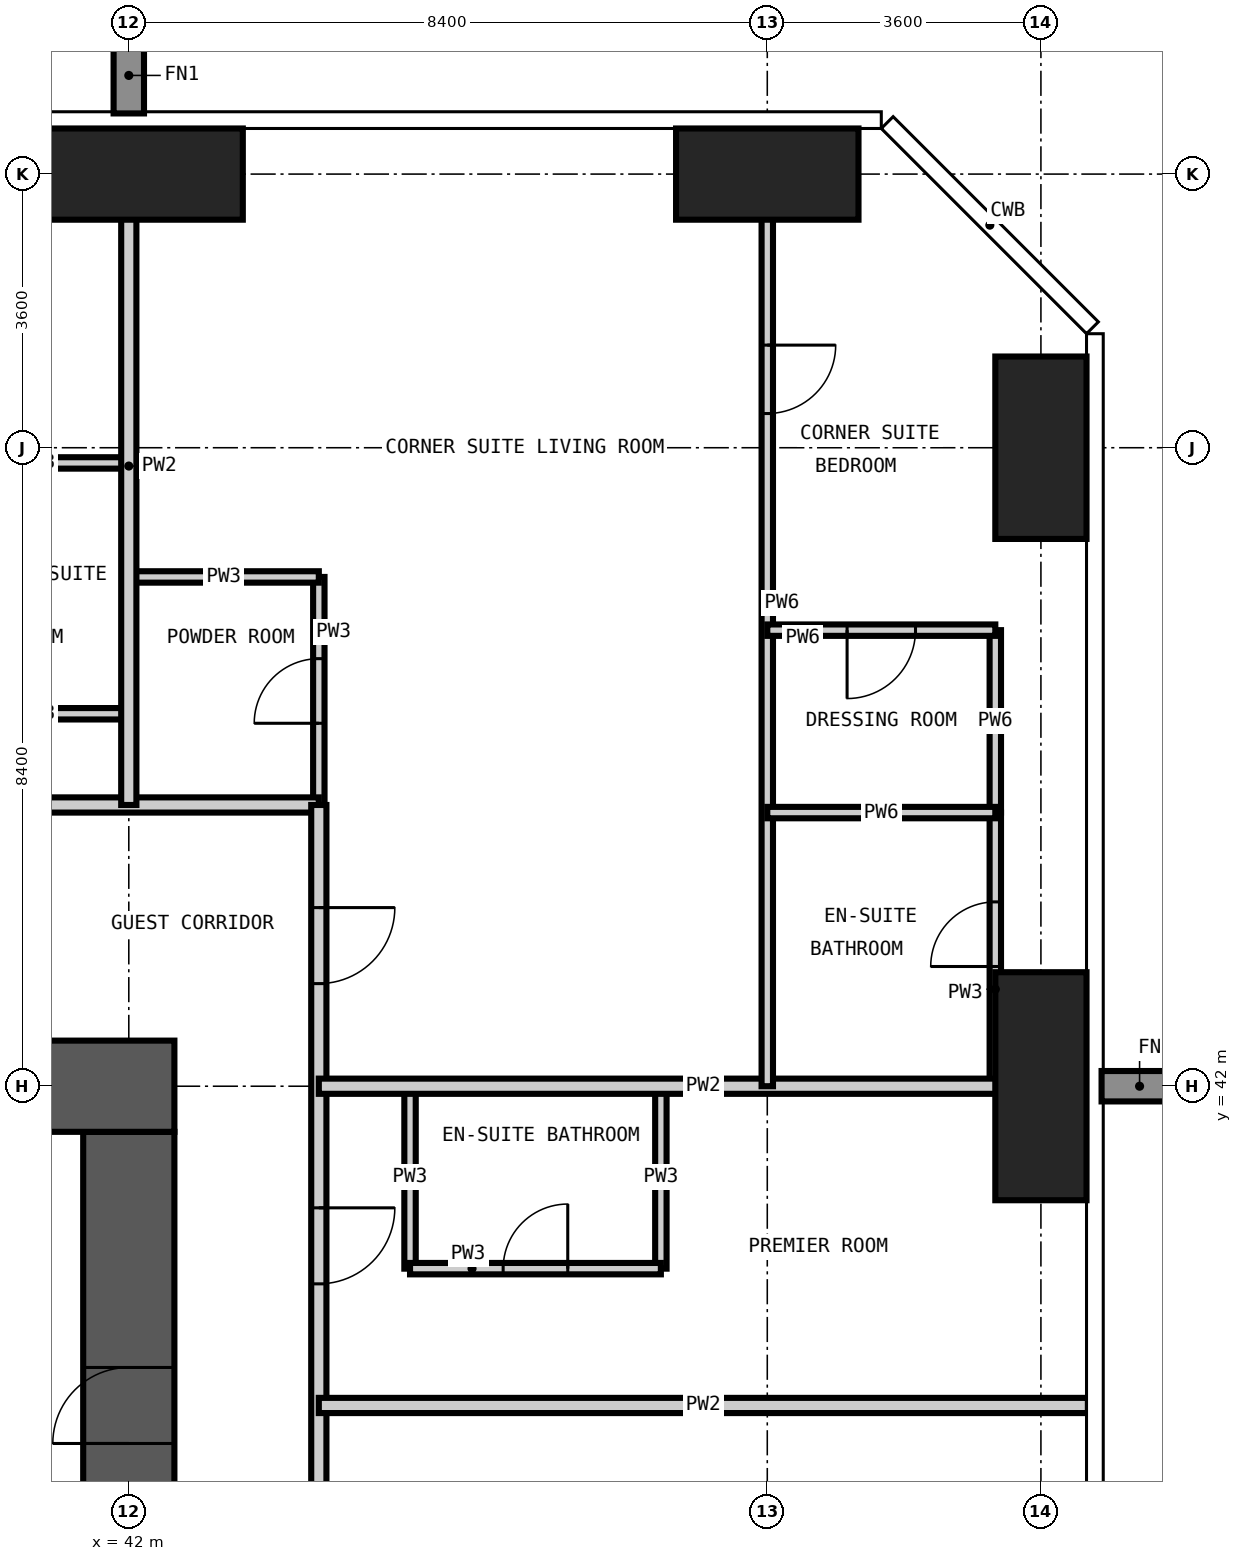
"""IFC4 building model, lengths in metres.
Left out: names, types, materials, properties, quantities, classifications, styles, units other than length and angle.
Written with IfcOpenShell. Run it as: python <this file> out.ifc"""

import sys

from ifc_helpers import new_model, si_unit, direction, frame, frame_2d, origin, origin_2d, place, context, subcontext, project, spatial, rectangle, extrude, element, fill, save


model = new_model("IFC4")
c1 = context("Model", 3, precision=1e-05, world=origin(), true_north=direction((0.0, 1.0)))
c2 = subcontext(c1, "Body", "Model", "MODEL_VIEW")
j1 = project(units=[si_unit("LENGTHUNIT", "METRE"), si_unit("PLANEANGLEUNIT", "RADIAN")], contexts=[c1])
p1 = place(None, origin())
s1 = spatial("IfcSite", under=j1, at=p1, CompositionType="ELEMENT")
p2 = place(p1, origin())
s2 = spatial("IfcBuilding", under=s1, at=p2, CompositionType="ELEMENT")
p3 = place(p2, frame((0.0, 0.0, 97.2)))
s3 = spatial("IfcBuildingStorey", under=s2, at=p3, CompositionType="ELEMENT", Elevation=97.2)
p4 = place(p3, frame((42.0, 54.0, -0.35), z_axis=(0.0, 0.0, 1.0), x_axis=(1.0, 0.0, 0.0)))
e1 = element("IfcColumn", 1, at=p4, inside=s3, PredefinedType="COLUMN", context=c2, shape_type="SweptSolid", body=[
    extrude(rectangle(XDim=3.0, YDim=1.2, at=origin_2d()), origin(), (0.0, 0.0, 1.0), 3.6),
])
p5 = place(p3, frame((50.4, 54.0, -0.35), z_axis=(0.0, 0.0, 1.0), x_axis=(1.0, 0.0, 0.0)))
e2 = element("IfcColumn", 2, at=p5, inside=s3, PredefinedType="COLUMN", context=c2, shape_type="SweptSolid", body=[
    extrude(rectangle(XDim=2.4, YDim=1.2, at=origin_2d()), origin(), (0.0, 0.0, 1.0), 3.6),
])
p6 = place(p3, frame((54.0, 42.0, -0.35), z_axis=(0.0, 0.0, 1.0), x_axis=(1.0, 0.0, 0.0)))
e3 = element("IfcColumn", 3, at=p6, inside=s3, PredefinedType="COLUMN", context=c2, shape_type="SweptSolid", body=[
    extrude(rectangle(XDim=1.2, YDim=3.0, at=origin_2d()), origin(), (0.0, 0.0, 1.0), 3.6),
])
p7 = place(p3, frame((54.0, 50.4, -0.35), z_axis=(0.0, 0.0, 1.0), x_axis=(1.0, 0.0, 0.0)))
e4 = element("IfcColumn", 4, at=p7, inside=s3, PredefinedType="COLUMN", context=c2, shape_type="SweptSolid", body=[
    extrude(rectangle(XDim=1.2, YDim=2.4, at=origin_2d()), origin(), (0.0, 0.0, 1.0), 3.6),
])
p8 = place(p3, frame((42.0, 17.4, -0.35), z_axis=(0.0, 0.0, 1.0), x_axis=(0.0, 1.0, 0.0)))
e5 = element("IfcWall", 5, at=p8, inside=s3, PredefinedType="SHEAR", context=c2, shape_type="SweptSolid", body=[
    extrude(rectangle(XDim=24.0, YDim=1.2, at=frame_2d((12.0, 0.0))), origin(), (0.0, 0.0, 1.0), 3.6),
])
p9 = place(p8, frame((0.2, 0.0, 0.35)))
e6 = element("IfcOpeningElement", 6, at=p9, cuts=e5, PredefinedType="OPENING", context=c2, shape_type="SweptSolid", body=[
    extrude(rectangle(XDim=1.2, YDim=2.2, at=frame_2d((0.6, 1.1))), frame((0.0, 0.61, 0.0), z_axis=(0.0, -1.0, 0.0), x_axis=(1.0, 0.0, 0.0)), (0.0, 0.0, 1.0), 1.22),
])
p10 = place(p8, frame((11.1, 0.0, 0.35)))
e7 = element("IfcOpeningElement", 7, at=p10, cuts=e5, PredefinedType="OPENING", context=c2, shape_type="SweptSolid", body=[
    extrude(rectangle(XDim=1.8, YDim=2.2, at=frame_2d((0.9, 1.1))), frame((0.0, 0.61, 0.0), z_axis=(0.0, -1.0, 0.0), x_axis=(1.0, 0.0, 0.0)), (0.0, 0.0, 1.0), 1.22),
])
p11 = place(p8, frame((19.9, 0.0, 0.35)))
e8 = element("IfcOpeningElement", 8, at=p11, cuts=e5, PredefinedType="OPENING", context=c2, shape_type="SweptSolid", body=[
    extrude(rectangle(XDim=1.0, YDim=2.1, at=frame_2d((0.5, 1.05))), frame((0.0, 0.61, 0.0), z_axis=(0.0, -1.0, 0.0), x_axis=(1.0, 0.0, 0.0)), (0.0, 0.0, 1.0), 1.22),
])
p12 = place(p3, frame((42.6, 42.0, -0.35), z_axis=(0.0, 0.0, 1.0), x_axis=(-1.0, 0.0, 0.0)))
e9 = element("IfcWall", 9, at=p12, inside=s3, PredefinedType="SHEAR", context=c2, shape_type="SweptSolid", body=[
    extrude(rectangle(XDim=26.4, YDim=1.2, at=frame_2d((13.2, 0.0))), origin(), (0.0, 0.0, 1.0), 3.6),
])
p13 = place(p12, frame((21.1, 0.0, 0.35)))
e10 = element("IfcOpeningElement", 10, at=p13, cuts=e9, PredefinedType="OPENING", context=c2, shape_type="SweptSolid", body=[
    extrude(rectangle(XDim=1.0, YDim=2.1, at=frame_2d((0.5, 1.05))), frame((0.0, 0.61, 0.0), z_axis=(0.0, -1.0, 0.0), x_axis=(1.0, 0.0, 0.0)), (0.0, 0.0, 1.0), 1.22),
])
p14 = place(p12, frame((10.5, 0.0, 0.35)))
e11 = element("IfcOpeningElement", 11, at=p14, cuts=e9, PredefinedType="OPENING", context=c2, shape_type="SweptSolid", body=[
    extrude(rectangle(XDim=1.2, YDim=2.2, at=frame_2d((0.6, 1.1))), frame((0.0, 0.61, 0.0), z_axis=(0.0, -1.0, 0.0), x_axis=(1.0, 0.0, 0.0)), (0.0, 0.0, 1.0), 1.22),
])
p15 = place(p3, frame((44.5, 45.7, 0.0), z_axis=(0.0, 0.0, 1.0), x_axis=(0.0, 1.0, 0.0)))
e12 = element("IfcWall", 12, at=p15, inside=s3, PredefinedType="PARTITIONING", context=c2, shape_type="SweptSolid", body=[
    extrude(rectangle(XDim=3.0, YDim=0.15, at=frame_2d((1.5, 0.0))), origin(), (0.0, 0.0, 1.0), 3.25),
])
p16 = place(p15, frame((1.075, 0.0, 0.0)))
e13 = element("IfcOpeningElement", 13, at=p16, cuts=e12, PredefinedType="OPENING", context=c2, shape_type="SweptSolid", body=[
    extrude(rectangle(XDim=0.85, YDim=2.1, at=frame_2d((0.425, 1.05))), frame((0.0, 0.085, 0.0), z_axis=(0.0, -1.0, 0.0), x_axis=(1.0, 0.0, 0.0)), (0.0, 0.0, 1.0), 0.17),
])
for number, where, z_axis, x_axis in (
    (14, (45.7, 39.6, 0.0), (0.0, 0.0, 1.0), (0.0, 1.0, 0.0)),
    (15, (49.0, 39.6, 0.0), (0.0, 0.0, 1.0), (0.0, 1.0, 0.0)),
):
    element("IfcWall", number, at=place(p3, frame(where, z_axis=z_axis, x_axis=x_axis)), inside=s3, PredefinedType="PARTITIONING", context=c2, shape_type="SweptSolid", body=[
        extrude(rectangle(XDim=2.4, YDim=0.15, at=frame_2d((1.2, 0.0))), origin(), (0.0, 0.0, 1.0), 3.25),
    ])
p17 = place(p3, frame((53.4, 42.0, 0.0), z_axis=(0.0, 0.0, 1.0), x_axis=(0.0, 1.0, 0.0)))
e16 = element("IfcWall", 16, at=p17, inside=s3, PredefinedType="PARTITIONING", context=c2, shape_type="SweptSolid", body=[
    extrude(rectangle(XDim=3.6, YDim=0.15, at=frame_2d((1.8, 0.0))), origin(), (0.0, 0.0, 1.0), 3.25),
])
p18 = place(p17, frame((1.575, 0.0, 0.0)))
e17 = element("IfcOpeningElement", 17, at=p18, cuts=e16, PredefinedType="OPENING", context=c2, shape_type="SweptSolid", body=[
    extrude(rectangle(XDim=0.85, YDim=2.1, at=frame_2d((0.425, 1.05))), frame((0.0, 0.085, 0.0), z_axis=(0.0, -1.0, 0.0), x_axis=(1.0, 0.0, 0.0)), (0.0, 0.0, 1.0), 0.17),
])
p19 = place(p3, frame((45.7, 39.6, 0.0), z_axis=(0.0, 0.0, 1.0), x_axis=(1.0, 0.0, 0.0)))
e18 = element("IfcWall", 18, at=p19, inside=s3, PredefinedType="PARTITIONING", context=c2, shape_type="SweptSolid", body=[
    extrude(rectangle(XDim=3.3, YDim=0.15, at=frame_2d((1.65, 0.0))), origin(), (0.0, 0.0, 1.0), 3.25),
])
p20 = place(p19, frame((1.225, 0.0, 0.0)))
e19 = element("IfcOpeningElement", 19, at=p20, cuts=e18, PredefinedType="OPENING", context=c2, shape_type="SweptSolid", body=[
    extrude(rectangle(XDim=0.85, YDim=2.1, at=frame_2d((0.425, 1.05))), frame((0.0, 0.085, 0.0), z_axis=(0.0, -1.0, 0.0), x_axis=(1.0, 0.0, 0.0)), (0.0, 0.0, 1.0), 0.17),
])
p21 = place(p3, frame((39.6, 46.9, 0.0), z_axis=(0.0, 0.0, 1.0), x_axis=(1.0, 0.0, 0.0)))
e20 = element("IfcWall", 20, at=p21, inside=s3, PredefinedType="PARTITIONING", context=c2, shape_type="SweptSolid", body=[
    extrude(rectangle(XDim=2.4, YDim=0.15, at=frame_2d((1.2, 0.0))), origin(), (0.0, 0.0, 1.0), 3.25),
])
p22 = place(p3, frame((42.0, 48.7, 0.0), z_axis=(0.0, 0.0, 1.0), x_axis=(1.0, 0.0, 0.0)))
e21 = element("IfcWall", 21, at=p22, inside=s3, PredefinedType="PARTITIONING", context=c2, shape_type="SweptSolid", body=[
    extrude(rectangle(XDim=2.5, YDim=0.15, at=frame_2d((1.25, 0.0))), origin(), (0.0, 0.0, 1.0), 3.25),
])
p23 = place(p3, frame((39.6, 50.2, 0.0), z_axis=(0.0, 0.0, 1.0), x_axis=(1.0, 0.0, 0.0)))
e22 = element("IfcWall", 22, at=p23, inside=s3, PredefinedType="PARTITIONING", context=c2, shape_type="SweptSolid", body=[
    extrude(rectangle(XDim=2.4, YDim=0.15, at=frame_2d((1.2, 0.0))), origin(), (0.0, 0.0, 1.0), 3.25),
])
p24 = place(p3, frame((12.6, 45.7, 0.0), z_axis=(0.0, 0.0, 1.0), x_axis=(1.0, 0.0, 0.0)))
e23 = element("IfcWall", 23, at=p24, inside=s3, PredefinedType="PARTITIONING", context=c2, shape_type="SweptSolid", body=[
    extrude(rectangle(XDim=31.9, YDim=0.2, at=frame_2d((15.95, 0.0))), origin(), (0.0, 0.0, 1.0), 3.25),
])
p25 = place(p24, frame((5.8, 0.0, 0.0)))
e24 = element("IfcOpeningElement", 24, at=p25, cuts=e23, PredefinedType="OPENING", context=c2, shape_type="SweptSolid", body=[
    extrude(rectangle(XDim=1.0, YDim=2.2, at=frame_2d((0.5, 1.1))), frame((0.0, 0.11, 0.0), z_axis=(0.0, -1.0, 0.0), x_axis=(1.0, 0.0, 0.0)), (0.0, 0.0, 1.0), 0.22),
])
p26 = place(p24, frame((12.1, 0.0, 0.0)))
e25 = element("IfcOpeningElement", 25, at=p26, cuts=e23, PredefinedType="OPENING", context=c2, shape_type="SweptSolid", body=[
    extrude(rectangle(XDim=1.0, YDim=2.2, at=frame_2d((0.5, 1.1))), frame((0.0, 0.11, 0.0), z_axis=(0.0, -1.0, 0.0), x_axis=(1.0, 0.0, 0.0)), (0.0, 0.0, 1.0), 0.22),
])
p27 = place(p24, frame((20.5, 0.0, 0.0)))
e26 = element("IfcOpeningElement", 26, at=p27, cuts=e23, PredefinedType="OPENING", context=c2, shape_type="SweptSolid", body=[
    extrude(rectangle(XDim=1.0, YDim=2.2, at=frame_2d((0.5, 1.1))), frame((0.0, 0.11, 0.0), z_axis=(0.0, -1.0, 0.0), x_axis=(1.0, 0.0, 0.0)), (0.0, 0.0, 1.0), 0.22),
])
p28 = place(p24, frame((26.8, 0.0, 0.0)))
e27 = element("IfcOpeningElement", 27, at=p28, cuts=e23, PredefinedType="OPENING", context=c2, shape_type="SweptSolid", body=[
    extrude(rectangle(XDim=1.0, YDim=2.2, at=frame_2d((0.5, 1.1))), frame((0.0, 0.11, 0.0), z_axis=(0.0, -1.0, 0.0), x_axis=(1.0, 0.0, 0.0)), (0.0, 0.0, 1.0), 0.22),
])
p29 = place(p3, frame((44.5, 45.7, 0.0), z_axis=(0.0, 0.0, 1.0), x_axis=(0.0, -1.0, 0.0)))
e28 = element("IfcWall", 28, at=p29, inside=s3, PredefinedType="PARTITIONING", context=c2, shape_type="SweptSolid", body=[
    extrude(rectangle(XDim=32.0, YDim=0.2, at=frame_2d((16.0, 0.0))), origin(), (0.0, 0.0, 1.0), 3.25),
])
p30 = place(p29, frame((26.3, 0.0, 0.0)))
e29 = element("IfcOpeningElement", 29, at=p30, cuts=e28, PredefinedType="OPENING", context=c2, shape_type="SweptSolid", body=[
    extrude(rectangle(XDim=1.0, YDim=2.2, at=frame_2d((0.5, 1.1))), frame((0.0, 0.11, 0.0), z_axis=(0.0, -1.0, 0.0), x_axis=(1.0, 0.0, 0.0)), (0.0, 0.0, 1.0), 0.22),
])
p31 = place(p29, frame((20.0, 0.0, 0.0)))
e30 = element("IfcOpeningElement", 30, at=p31, cuts=e28, PredefinedType="OPENING", context=c2, shape_type="SweptSolid", body=[
    extrude(rectangle(XDim=1.0, YDim=2.2, at=frame_2d((0.5, 1.1))), frame((0.0, 0.11, 0.0), z_axis=(0.0, -1.0, 0.0), x_axis=(1.0, 0.0, 0.0)), (0.0, 0.0, 1.0), 0.22),
])
p32 = place(p29, frame((11.6, 0.0, 0.0)))
e31 = element("IfcOpeningElement", 31, at=p32, cuts=e28, PredefinedType="OPENING", context=c2, shape_type="SweptSolid", body=[
    extrude(rectangle(XDim=1.0, YDim=2.2, at=frame_2d((0.5, 1.1))), frame((0.0, 0.11, 0.0), z_axis=(0.0, -1.0, 0.0), x_axis=(1.0, 0.0, 0.0)), (0.0, 0.0, 1.0), 0.22),
])
p33 = place(p29, frame((5.3, 0.0, 0.0)))
e32 = element("IfcOpeningElement", 32, at=p33, cuts=e28, PredefinedType="OPENING", context=c2, shape_type="SweptSolid", body=[
    extrude(rectangle(XDim=1.0, YDim=2.2, at=frame_2d((0.5, 1.1))), frame((0.0, 0.11, 0.0), z_axis=(0.0, -1.0, 0.0), x_axis=(1.0, 0.0, 0.0)), (0.0, 0.0, 1.0), 0.22),
])
p34 = place(p29, frame((29.95, 0.0, 0.0)))
e33 = element("IfcOpeningElement", 33, at=p34, cuts=e28, PredefinedType="OPENING", context=c2, shape_type="SweptSolid", body=[
    extrude(rectangle(XDim=1.0, YDim=2.2, at=frame_2d((0.5, 1.1))), frame((0.0, 0.11, 0.0), z_axis=(0.0, -1.0, 0.0), x_axis=(1.0, 0.0, 0.0)), (0.0, 0.0, 1.0), 0.22),
])
p35 = place(p29, frame((1.35, 0.0, 0.0)))
e34 = element("IfcOpeningElement", 34, at=p35, cuts=e28, PredefinedType="OPENING", context=c2, shape_type="SweptSolid", body=[
    extrude(rectangle(XDim=1.0, YDim=2.2, at=frame_2d((0.5, 1.1))), frame((0.0, 0.11, 0.0), z_axis=(0.0, -1.0, 0.0), x_axis=(1.0, 0.0, 0.0)), (0.0, 0.0, 1.0), 0.22),
])
p36 = place(p3, frame((42.0, 45.7, 0.0), z_axis=(0.0, 0.0, 1.0), x_axis=(0.0, 1.0, 0.0)))
e35 = element("IfcWall", 35, at=p36, inside=s3, PredefinedType="PARTITIONING", context=c2, shape_type="SweptSolid", body=[
    extrude(rectangle(XDim=8.918, YDim=0.2, at=frame_2d((4.459, 0.0))), origin(), (0.0, 0.0, 1.0), 3.25),
])
for number, where, z_axis, x_axis in (
    (36, (44.5, 37.8, 0.0), (0.0, 0.0, 1.0), (1.0, 0.0, 0.0)),
    (37, (44.5, 42.0, 0.0), (0.0, 0.0, 1.0), (1.0, 0.0, 0.0)),
):
    element("IfcWall", number, at=place(p3, frame(where, z_axis=z_axis, x_axis=x_axis)), inside=s3, PredefinedType="PARTITIONING", context=c2, shape_type="SweptSolid", body=[
        extrude(rectangle(XDim=10.118, YDim=0.2, at=frame_2d((5.059, 0.0))), origin(), (0.0, 0.0, 1.0), 3.25),
    ])
p37 = place(p3, frame((50.4, 42.0, 0.0), z_axis=(0.0, 0.0, 1.0), x_axis=(0.0, 1.0, 0.0)))
e38 = element("IfcWall", 38, at=p37, inside=s3, PredefinedType="PARTITIONING", context=c2, shape_type="SweptSolid", body=[
    extrude(rectangle(XDim=12.618, YDim=0.15, at=frame_2d((6.309, 0.0))), origin(), (0.0, 0.0, 1.0), 3.25),
])
p38 = place(p37, frame((8.85, 0.0, 0.0)))
e39 = element("IfcOpeningElement", 39, at=p38, cuts=e38, PredefinedType="OPENING", context=c2, shape_type="SweptSolid", body=[
    extrude(rectangle(XDim=0.9, YDim=2.1, at=frame_2d((0.45, 1.05))), frame((0.0, 0.085, 0.0), z_axis=(0.0, -1.0, 0.0), x_axis=(1.0, 0.0, 0.0)), (0.0, 0.0, 1.0), 0.17),
])
p39 = place(p3, frame((53.4, 45.6, 0.0), z_axis=(0.0, 0.0, 1.0), x_axis=(0.0, 1.0, 0.0)))
e40 = element("IfcWall", 40, at=p39, inside=s3, PredefinedType="PARTITIONING", context=c2, shape_type="SweptSolid", body=[
    extrude(rectangle(XDim=2.4, YDim=0.15, at=frame_2d((1.2, 0.0))), origin(), (0.0, 0.0, 1.0), 3.25),
])
p40 = place(p3, frame((50.4, 45.6, 0.0), z_axis=(0.0, 0.0, 1.0), x_axis=(1.0, 0.0, 0.0)))
e41 = element("IfcWall", 41, at=p40, inside=s3, PredefinedType="PARTITIONING", context=c2, shape_type="SweptSolid", body=[
    extrude(rectangle(XDim=3.0, YDim=0.15, at=frame_2d((1.5, 0.0))), origin(), (0.0, 0.0, 1.0), 3.25),
])
p41 = place(p3, frame((50.4, 48.0, 0.0), z_axis=(0.0, 0.0, 1.0), x_axis=(1.0, 0.0, 0.0)))
e42 = element("IfcWall", 42, at=p41, inside=s3, PredefinedType="PARTITIONING", context=c2, shape_type="SweptSolid", body=[
    extrude(rectangle(XDim=3.0, YDim=0.15, at=frame_2d((1.5, 0.0))), origin(), (0.0, 0.0, 1.0), 3.25),
])
p42 = place(p41, frame((1.05, 0.0, 0.0)))
e43 = element("IfcOpeningElement", 43, at=p42, cuts=e42, PredefinedType="OPENING", context=c2, shape_type="SweptSolid", body=[
    extrude(rectangle(XDim=0.9, YDim=2.1, at=frame_2d((0.45, 1.05))), frame((0.0, 0.085, 0.0), z_axis=(0.0, -1.0, 0.0), x_axis=(1.0, 0.0, 0.0)), (0.0, 0.0, 1.0), 0.17),
])
p43 = place(p33, origin())
e44 = element("IfcDoor", 44, at=p43, inside=s3, OperationType="SINGLE_SWING_LEFT", PredefinedType="DOOR", context=c2, shape_type="SweptSolid", body=[
    extrude(rectangle(XDim=1.0, YDim=2.2, at=frame_2d((0.5, 1.1))), frame((0.0, 0.025, 0.0), z_axis=(0.0, -1.0, 0.0), x_axis=(1.0, 0.0, 0.0)), (0.0, 0.0, 1.0), 0.05),
])
fill(e32, e44)
p44 = place(p20, origin())
e45 = element("IfcDoor", 45, at=p44, inside=s3, OperationType="SINGLE_SWING_RIGHT", PredefinedType="DOOR", context=c2, shape_type="SweptSolid", body=[
    extrude(rectangle(XDim=0.85, YDim=2.1, at=frame_2d((0.425, 1.05))), frame((0.0, 0.025, 0.0), z_axis=(0.0, -1.0, 0.0), x_axis=(1.0, 0.0, 0.0)), (0.0, 0.0, 1.0), 0.05),
])
fill(e19, e45)
p45 = place(p35, origin())
e46 = element("IfcDoor", 46, at=p45, inside=s3, OperationType="SINGLE_SWING_LEFT", PredefinedType="DOOR", context=c2, shape_type="SweptSolid", body=[
    extrude(rectangle(XDim=1.0, YDim=2.2, at=frame_2d((0.5, 1.1))), frame((0.0, 0.025, 0.0), z_axis=(0.0, -1.0, 0.0), x_axis=(1.0, 0.0, 0.0)), (0.0, 0.0, 1.0), 0.05),
])
fill(e34, e46)
p46 = place(p16, origin())
e47 = element("IfcDoor", 47, at=p46, inside=s3, OperationType="SINGLE_SWING_LEFT", PredefinedType="DOOR", context=c2, shape_type="SweptSolid", body=[
    extrude(rectangle(XDim=0.85, YDim=2.1, at=frame_2d((0.425, 1.05))), frame((0.0, 0.025, 0.0), z_axis=(0.0, -1.0, 0.0), x_axis=(1.0, 0.0, 0.0)), (0.0, 0.0, 1.0), 0.05),
])
fill(e13, e47)
p47 = place(p38, frame((0.9, 0.0, 0.0), z_axis=(0.0, 0.0, 1.0), x_axis=(-1.0, 0.0, 0.0)))
e48 = element("IfcDoor", 48, at=p47, inside=s3, OperationType="SINGLE_SWING_LEFT", PredefinedType="DOOR", context=c2, shape_type="SweptSolid", body=[
    extrude(rectangle(XDim=0.9, YDim=2.1, at=frame_2d((0.45, 1.05))), frame((0.0, 0.025, 0.0), z_axis=(0.0, -1.0, 0.0), x_axis=(1.0, 0.0, 0.0)), (0.0, 0.0, 1.0), 0.05),
])
fill(e39, e48)
p48 = place(p18, origin())
e49 = element("IfcDoor", 49, at=p48, inside=s3, OperationType="SINGLE_SWING_LEFT", PredefinedType="DOOR", context=c2, shape_type="SweptSolid", body=[
    extrude(rectangle(XDim=0.85, YDim=2.1, at=frame_2d((0.425, 1.05))), frame((0.0, 0.025, 0.0), z_axis=(0.0, -1.0, 0.0), x_axis=(1.0, 0.0, 0.0)), (0.0, 0.0, 1.0), 0.05),
])
fill(e17, e49)
p49 = place(p42, frame((0.9, 0.0, 0.0), z_axis=(0.0, 0.0, 1.0), x_axis=(-1.0, 0.0, 0.0)))
e50 = element("IfcDoor", 50, at=p49, inside=s3, OperationType="SINGLE_SWING_RIGHT", PredefinedType="DOOR", context=c2, shape_type="SweptSolid", body=[
    extrude(rectangle(XDim=0.9, YDim=2.1, at=frame_2d((0.45, 1.05))), frame((0.0, 0.025, 0.0), z_axis=(0.0, -1.0, 0.0), x_axis=(1.0, 0.0, 0.0)), (0.0, 0.0, 1.0), 0.05),
])
fill(e43, e50)
p50 = place(p11, origin())
e51 = element("IfcDoor", 51, at=p50, inside=s3, OperationType="SINGLE_SWING_LEFT", PredefinedType="DOOR", context=c2, shape_type="SweptSolid", body=[
    extrude(rectangle(XDim=1.0, YDim=2.1, at=frame_2d((0.5, 1.05))), frame((0.0, 0.025, 0.0), z_axis=(0.0, -1.0, 0.0), x_axis=(1.0, 0.0, 0.0)), (0.0, 0.0, 1.0), 0.05),
])
fill(e8, e51)
save(model, sys.argv[1])
